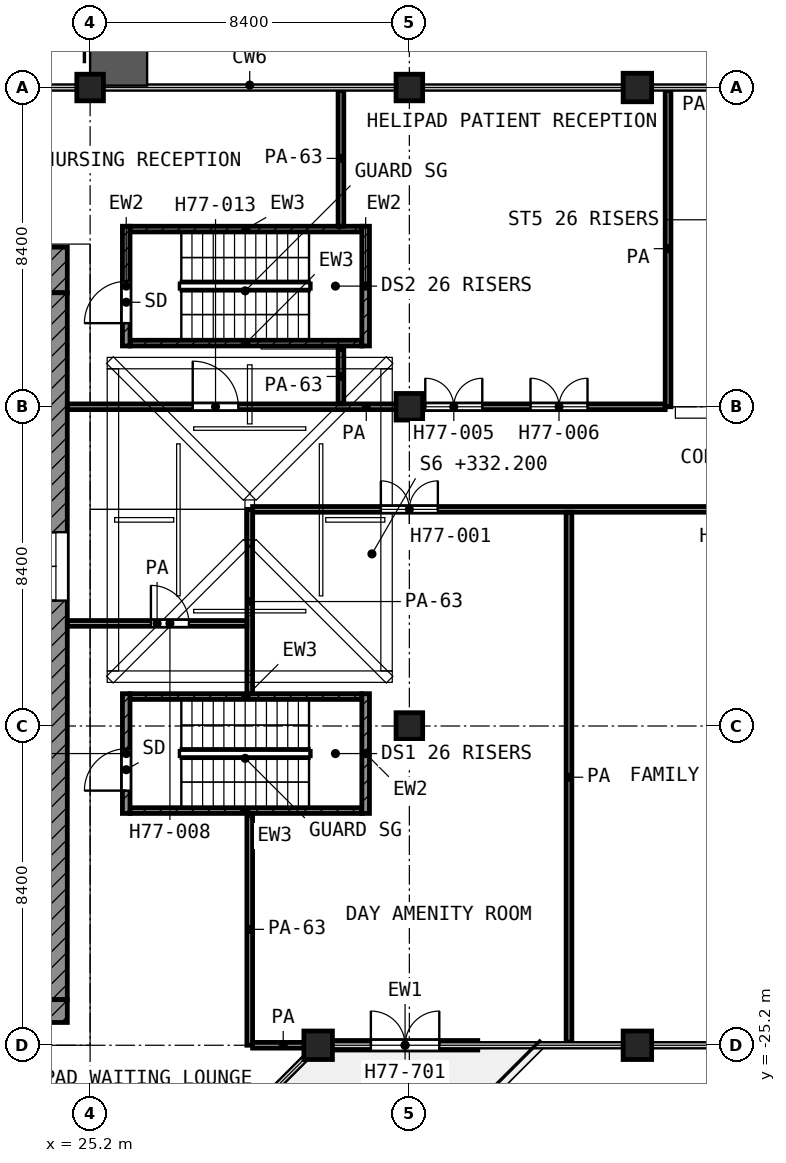
"""IFC4 building model, lengths in metres.
Left out: names, types, materials, properties, quantities, classifications, styles, units other than length and angle.
Written with IfcOpenShell. Run it as: python <this file> out.ifc"""

import sys

from ifc_helpers import new_model, si_unit, direction, frame, frame_2d, origin, origin_2d, place, context, subcontext, project, spatial, polyline, rectangle, outline, extrude, element, fill, save


model = new_model("IFC4")
c1 = context("Model", 3, precision=1e-05, world=origin(), true_north=direction((0.0, 1.0)))
c2 = subcontext(c1, "Body", "Model", "MODEL_VIEW")
j1 = project(units=[si_unit("LENGTHUNIT", "METRE"), si_unit("PLANEANGLEUNIT", "RADIAN")], contexts=[c1])
p1 = place(None, origin())
s1 = spatial("IfcSite", under=j1, at=p1, CompositionType="ELEMENT")
p2 = place(p1, origin())
s2 = spatial("IfcBuilding", under=s1, at=p2, CompositionType="ELEMENT")
p3 = place(p2, frame((0.0, 0.0, 332.2)))
s3 = spatial("IfcBuildingStorey", under=s2, at=p3, CompositionType="ELEMENT", Elevation=332.2)
for number, where, z_axis, x_axis in (
    (1, (25.2, 0.0, 0.0), (0.0, 0.0, 1.0), (1.0, 0.0, 0.0)),
    (2, (33.6, 0.0, 0.0), (0.0, 0.0, 1.0), (1.0, 0.0, 0.0)),
    (3, (33.6, -8.4, 0.0), (0.0, 0.0, 1.0), (1.0, 0.0, 0.0)),
    (4, (33.6, -16.8, 0.0), (0.0, 0.0, 1.0), (1.0, 0.0, 0.0)),
):
    element("IfcColumn", number, at=place(p3, frame(where, z_axis=z_axis, x_axis=x_axis)), inside=s3, PredefinedType="COLUMN", context=c2, shape_type="SweptSolid", body=[
        extrude(rectangle(XDim=0.7, YDim=0.7, at=origin_2d()), origin(), (0.0, 0.0, 1.0), 4.5),
    ])
for number, where, z_axis, x_axis in (
    (5, (31.2, -25.2, 0.0), (0.0, 0.0, 1.0), (1.0, 0.0, 0.0)),
    (6, (39.6, 0.0, 0.0), (0.0, 0.0, 1.0), (1.0, 0.0, 0.0)),
    (7, (39.6, -25.2, 0.0), (0.0, 0.0, 1.0), (1.0, 0.0, 0.0)),
):
    element("IfcColumn", number, at=place(p3, frame(where, z_axis=z_axis, x_axis=x_axis)), inside=s3, PredefinedType="COLUMN", context=c2, shape_type="SweptSolid", body=[
        extrude(rectangle(XDim=0.75, YDim=0.75, at=origin_2d()), origin(), (0.0, 0.0, 1.0), 4.5),
    ])
p4 = place(p3, frame((31.575, -25.2, 0.0), z_axis=(0.0, 0.0, 1.0), x_axis=(1.0, 0.0, 0.0)))
e8 = element("IfcWall", 8, at=p4, inside=s3, PredefinedType="SOLIDWALL", context=c2, shape_type="SweptSolid", body=[
    extrude(rectangle(XDim=3.825, YDim=0.25, at=frame_2d((1.913, 0.0))), origin(), (0.0, 0.0, 1.0), 3.79),
])
p5 = place(p4, frame((1.012, 0.0, 0.0)))
e9 = element("IfcOpeningElement", 9, at=p5, cuts=e8, PredefinedType="OPENING", context=c2, shape_type="SweptSolid", body=[
    extrude(rectangle(XDim=1.8, YDim=2.1, at=frame_2d((0.9, 1.05))), frame((0.0, 0.135, 0.0), z_axis=(0.0, -1.0, 0.0), x_axis=(1.0, 0.0, 0.0)), (0.0, 0.0, 1.0), 0.27),
])
p6 = place(p3, frame((39.228, -25.075, 4.5), z_axis=(0.0, 0.0, 1.0), x_axis=(-1.0, 0.0, 0.0)))
e10 = element("IfcWall", 10, at=p6, inside=s3, PredefinedType="SOLIDWALL", context=c2, shape_type="SweptSolid", body=[
    extrude(rectangle(XDim=8.131, YDim=0.25, at=frame_2d((4.065, 0.0))), origin(), (0.0, 0.0, 1.0), 1.1),
])
p7 = place(p3, frame((31.112, -25.112, 4.5), z_axis=(0.0, 0.0, 1.0), x_axis=(-0.707106781187, -0.707106781187, 0.0)))
e11 = element("IfcWall", 11, at=p7, inside=s3, PredefinedType="SOLIDWALL", context=c2, shape_type="SweptSolid", body=[
    extrude(rectangle(XDim=8.31, YDim=0.25, at=frame_2d((4.155, 0.0))), origin(), (0.0, 0.0, 1.0), 1.1),
])
p8 = place(p3, frame((25.375, -0.125, 4.5), z_axis=(0.0, 0.0, 1.0), x_axis=(1.0, 0.0, 0.0)))
e12 = element("IfcWall", 12, at=p8, inside=s3, PredefinedType="SOLIDWALL", context=c2, shape_type="SweptSolid", body=[
    extrude(rectangle(XDim=13.853, YDim=0.25, at=frame_2d((6.926, 0.0))), origin(), (0.0, 0.0, 1.0), 1.1),
])
p9 = place(p3, frame((28.675, -19.25, 4.5), z_axis=(0.0, 0.0, 1.0), x_axis=(0.0, -1.0, 0.0)))
e13 = element("IfcWall", 13, at=p9, inside=s3, PredefinedType="SOLIDWALL", context=c2, shape_type="SweptSolid", body=[
    extrude(rectangle(XDim=4.4, YDim=0.25, at=frame_2d((2.2, 0.0))), origin(), (0.0, 0.0, 1.0), 1.1),
])
p10 = place(p3, frame((32.175, -19.25, 4.5), z_axis=(0.0, 0.0, 1.0), x_axis=(0.0, -1.0, 0.0)))
e14 = element("IfcWall", 14, at=p10, inside=s3, PredefinedType="SOLIDWALL", context=c2, shape_type="SweptSolid", body=[
    extrude(rectangle(XDim=4.4, YDim=0.25, at=frame_2d((2.2, 0.0))), origin(), (0.0, 0.0, 1.0), 1.717),
])
for number, where, z_axis, x_axis in (
    (15, (28.8, -19.375, 4.5), (0.0, 0.0, 1.0), (1.0, 0.0, 0.0)),
    (16, (28.8, -23.525, 4.5), (0.0, 0.0, 1.0), (1.0, 0.0, 0.0)),
):
    element("IfcWall", number, at=place(p3, frame(where, z_axis=z_axis, x_axis=x_axis)), inside=s3, PredefinedType="SOLIDWALL", context=c2, shape_type="SweptSolid", body=[
        extrude(outline(polyline([(0.0, 0.0), (3.25, 0.0), (3.25, 1.695), (0.0, 1.122), (0.0, 0.0)])), frame((0.0, 0.125, 0.0), z_axis=(0.0, -1.0, 0.0), x_axis=(1.0, 0.0, 0.0)), (0.0, 0.0, 1.0), 0.25),
    ])
p11 = place(p3, frame((25.05, 0.683, 4.5), z_axis=(0.0, 0.0, 1.0), x_axis=(0.0, -1.0, 0.0)))
e17 = element("IfcWall", 17, at=p11, inside=s3, PredefinedType="SOLIDWALL", context=c2, shape_type="SweptSolid", body=[
    extrude(rectangle(XDim=0.551, YDim=0.25, at=frame_2d((0.275, 0.0))), origin(), (0.0, 0.0, 1.0), 1.1),
])
p12 = place(p3, frame((4.2, -4.8, 0.0), z_axis=(0.0, 0.0, 1.0), x_axis=(1.0, 0.0, 0.0)))
e18 = element("IfcWall", 18, at=p12, inside=s3, PredefinedType="SHEAR", context=c2, shape_type="SweptSolid", body=[
    extrude(rectangle(XDim=20.4, YDim=1.2, at=frame_2d((10.2, 0.0))), origin(), (0.0, 0.0, 1.0), 3.95),
])
p13 = place(p12, frame((1.95, 0.0, 0.0)))
e19 = element("IfcOpeningElement", 19, at=p13, cuts=e18, PredefinedType="OPENING", context=c2, shape_type="SweptSolid", body=[
    extrude(rectangle(XDim=1.1, YDim=2.1, at=frame_2d((0.55, 1.05))), frame((0.0, 0.61, 0.0), z_axis=(0.0, -1.0, 0.0), x_axis=(1.0, 0.0, 0.0)), (0.0, 0.0, 1.0), 1.22),
])
p14 = place(p12, frame((17.95, 0.0, 0.0)))
e20 = element("IfcOpeningElement", 20, at=p14, cuts=e18, PredefinedType="OPENING", context=c2, shape_type="SweptSolid", body=[
    extrude(rectangle(XDim=1.1, YDim=2.1, at=frame_2d((0.55, 1.05))), frame((0.0, 0.61, 0.0), z_axis=(0.0, -1.0, 0.0), x_axis=(1.0, 0.0, 0.0)), (0.0, 0.0, 1.0), 1.22),
])
p15 = place(p3, frame((24.3, -24.0, 0.0), z_axis=(0.0, 0.0, 1.0), x_axis=(0.0, 1.0, 0.0)))
e21 = element("IfcWall", 21, at=p15, inside=s3, PredefinedType="SHEAR", context=c2, shape_type="SweptSolid", body=[
    extrude(rectangle(XDim=18.6, YDim=0.6, at=frame_2d((9.3, 0.0))), origin(), (0.0, 0.0, 1.0), 3.95),
])
p16 = place(p15, frame((10.5, 0.0, 0.0)))
e22 = element("IfcOpeningElement", 22, at=p16, cuts=e21, PredefinedType="OPENING", context=c2, shape_type="SweptSolid", body=[
    extrude(rectangle(XDim=1.8, YDim=2.1, at=frame_2d((0.9, 1.05))), frame((0.0, 0.31, 0.0), z_axis=(0.0, -1.0, 0.0), x_axis=(1.0, 0.0, 0.0)), (0.0, 0.0, 1.0), 0.62),
])
p17 = place(p3, frame((24.3, -24.6, 0.0), z_axis=(0.0, 0.0, 1.0), x_axis=(0.0, 1.0, 0.0)))
e23 = element("IfcWall", 23, at=p17, inside=s3, PredefinedType="SHEAR", context=c2, shape_type="SweptSolid", body=[
    extrude(rectangle(XDim=0.6, YDim=0.6, at=frame_2d((0.3, 0.0))), origin(), (0.0, 0.0, 1.0), 3.95),
])
p18 = place(p3, frame((26.15, -19.1, 0.0), z_axis=(0.0, 0.0, 1.0), x_axis=(0.0, 1.0, 0.0)))
e24 = element("IfcWall", 24, at=p18, inside=s3, PredefinedType="SHEAR", context=c2, shape_type="SweptSolid", body=[
    extrude(rectangle(XDim=3.15, YDim=0.2, at=frame_2d((1.575, 0.0))), origin(), (0.0, 0.0, 1.0), 3.95),
])
p19 = place(p18, frame((0.6, 0.0, 0.0)))
e25 = element("IfcOpeningElement", 25, at=p19, cuts=e24, PredefinedType="OPENING", context=c2, shape_type="SweptSolid", body=[
    extrude(rectangle(XDim=1.1, YDim=2.1, at=frame_2d((0.55, 1.05))), frame((0.0, 0.11, 0.0), z_axis=(0.0, -1.0, 0.0), x_axis=(1.0, 0.0, 0.0)), (0.0, 0.0, 1.0), 0.22),
])
p20 = place(p3, frame((32.45, -19.1, 0.0), z_axis=(0.0, 0.0, 1.0), x_axis=(0.0, 1.0, 0.0)))
e26 = element("IfcWall", 26, at=p20, inside=s3, PredefinedType="SHEAR", context=c2, shape_type="SweptSolid", body=[
    extrude(rectangle(XDim=3.15, YDim=0.2, at=frame_2d((1.575, 0.0))), origin(), (0.0, 0.0, 1.0), 3.95),
])
for number, where, z_axis, x_axis in (
    (27, (26.25, -16.025, 0.0), (0.0, 0.0, 1.0), (1.0, 0.0, 0.0)),
    (28, (26.25, -19.025, 0.0), (0.0, 0.0, 1.0), (1.0, 0.0, 0.0)),
):
    element("IfcWall", number, at=place(p3, frame(where, z_axis=z_axis, x_axis=x_axis)), inside=s3, PredefinedType="SHEAR", context=c2, shape_type="SweptSolid", body=[
        extrude(rectangle(XDim=6.1, YDim=0.15, at=frame_2d((3.05, 0.0))), origin(), (0.0, 0.0, 1.0), 3.95),
    ])
p21 = place(p3, frame((26.15, -6.8, 0.0), z_axis=(0.0, 0.0, 1.0), x_axis=(0.0, 1.0, 0.0)))
e29 = element("IfcWall", 29, at=p21, inside=s3, PredefinedType="SHEAR", context=c2, shape_type="SweptSolid", body=[
    extrude(rectangle(XDim=3.15, YDim=0.2, at=frame_2d((1.575, 0.0))), origin(), (0.0, 0.0, 1.0), 3.95),
])
p22 = place(p21, frame((0.6, 0.0, 0.0)))
e30 = element("IfcOpeningElement", 30, at=p22, cuts=e29, PredefinedType="OPENING", context=c2, shape_type="SweptSolid", body=[
    extrude(rectangle(XDim=1.1, YDim=2.1, at=frame_2d((0.55, 1.05))), frame((0.0, 0.11, 0.0), z_axis=(0.0, -1.0, 0.0), x_axis=(1.0, 0.0, 0.0)), (0.0, 0.0, 1.0), 0.22),
])
p23 = place(p3, frame((32.45, -6.8, 0.0), z_axis=(0.0, 0.0, 1.0), x_axis=(0.0, 1.0, 0.0)))
e31 = element("IfcWall", 31, at=p23, inside=s3, PredefinedType="SHEAR", context=c2, shape_type="SweptSolid", body=[
    extrude(rectangle(XDim=3.15, YDim=0.2, at=frame_2d((1.575, 0.0))), origin(), (0.0, 0.0, 1.0), 3.95),
])
for number, where, z_axis, x_axis in (
    (32, (26.25, -3.725, 0.0), (0.0, 0.0, 1.0), (1.0, 0.0, 0.0)),
    (33, (26.25, -6.725, 0.0), (0.0, 0.0, 1.0), (1.0, 0.0, 0.0)),
):
    element("IfcWall", number, at=place(p3, frame(where, z_axis=z_axis, x_axis=x_axis)), inside=s3, PredefinedType="SHEAR", context=c2, shape_type="SweptSolid", body=[
        extrude(rectangle(XDim=6.1, YDim=0.15, at=frame_2d((3.05, 0.0))), origin(), (0.0, 0.0, 1.0), 3.95),
    ])
p24 = place(p3, frame((29.475, -25.2, 0.0), z_axis=(0.0, 0.0, 1.0), x_axis=(1.0, 0.0, 0.0)))
e34 = element("IfcWall", 34, at=p24, inside=s3, PredefinedType="PARTITIONING", context=c2, shape_type="SweptSolid", body=[
    extrude(rectangle(XDim=1.612, YDim=0.15, at=frame_2d((0.806, 0.0))), origin(), (0.0, 0.0, 1.0), 3.95),
])
p25 = place(p3, frame((24.6, -14.1, 0.0), z_axis=(0.0, 0.0, 1.0), x_axis=(1.0, 0.0, 0.0)))
e35 = element("IfcWall", 35, at=p25, inside=s3, PredefinedType="PARTITIONING", context=c2, shape_type="SweptSolid", body=[
    extrude(rectangle(XDim=4.725, YDim=0.15, at=frame_2d((2.362, 0.0))), origin(), (0.0, 0.0, 1.0), 3.95),
])
p26 = place(p25, frame((2.2, 0.0, 0.0)))
e36 = element("IfcOpeningElement", 36, at=p26, cuts=e35, PredefinedType="OPENING", context=c2, shape_type="SweptSolid", body=[
    extrude(rectangle(XDim=1.0, YDim=2.1, at=frame_2d((0.5, 1.05))), frame((0.0, 0.085, 0.0), z_axis=(0.0, -1.0, 0.0), x_axis=(1.0, 0.0, 0.0)), (0.0, 0.0, 1.0), 0.17),
])
p27 = place(p3, frame((29.475, -11.1, 0.0), z_axis=(0.0, 0.0, 1.0), x_axis=(1.0, 0.0, 0.0)))
e37 = element("IfcWall", 37, at=p27, inside=s3, PredefinedType="PARTITIONING", context=c2, shape_type="SweptSolid", body=[
    extrude(rectangle(XDim=29.245, YDim=0.15, at=frame_2d((14.623, 0.0))), origin(), (0.0, 0.0, 1.0), 3.95),
])
p28 = place(p27, frame((3.375, 0.0, 0.0)))
e38 = element("IfcOpeningElement", 38, at=p28, cuts=e37, PredefinedType="OPENING", context=c2, shape_type="SweptSolid", body=[
    extrude(rectangle(XDim=1.5, YDim=2.1, at=frame_2d((0.75, 1.05))), frame((0.0, 0.085, 0.0), z_axis=(0.0, -1.0, 0.0), x_axis=(1.0, 0.0, 0.0)), (0.0, 0.0, 1.0), 0.17),
])
p29 = place(p27, frame((12.075, 0.0, 0.0)))
e39 = element("IfcOpeningElement", 39, at=p29, cuts=e37, PredefinedType="OPENING", context=c2, shape_type="SweptSolid", body=[
    extrude(rectangle(XDim=1.5, YDim=2.1, at=frame_2d((0.75, 1.05))), frame((0.0, 0.085, 0.0), z_axis=(0.0, -1.0, 0.0), x_axis=(1.0, 0.0, 0.0)), (0.0, 0.0, 1.0), 0.17),
])
p30 = place(p27, frame((18.625, 0.0, 0.0)))
e40 = element("IfcOpeningElement", 40, at=p30, cuts=e37, PredefinedType="OPENING", context=c2, shape_type="SweptSolid", body=[
    extrude(rectangle(XDim=1.0, YDim=2.1, at=frame_2d((0.5, 1.05))), frame((0.0, 0.085, 0.0), z_axis=(0.0, -1.0, 0.0), x_axis=(1.0, 0.0, 0.0)), (0.0, 0.0, 1.0), 0.17),
])
p31 = place(p27, frame((24.375, 0.0, 0.0)))
e41 = element("IfcOpeningElement", 41, at=p31, cuts=e37, PredefinedType="OPENING", context=c2, shape_type="SweptSolid", body=[
    extrude(rectangle(XDim=1.5, YDim=2.1, at=frame_2d((0.75, 1.05))), frame((0.0, 0.085, 0.0), z_axis=(0.0, -1.0, 0.0), x_axis=(1.0, 0.0, 0.0)), (0.0, 0.0, 1.0), 0.17),
])
p32 = place(p3, frame((24.6, -8.4, 0.0), z_axis=(0.0, 0.0, 1.0), x_axis=(1.0, 0.0, 0.0)))
e42 = element("IfcWall", 42, at=p32, inside=s3, PredefinedType="PARTITIONING", context=c2, shape_type="SweptSolid", body=[
    extrude(rectangle(XDim=15.732, YDim=0.15, at=frame_2d((7.866, 0.0))), origin(), (0.0, 0.0, 1.0), 3.95),
])
p33 = place(p32, frame((3.3, 0.0, 0.0)))
e43 = element("IfcOpeningElement", 43, at=p33, cuts=e42, PredefinedType="OPENING", context=c2, shape_type="SweptSolid", body=[
    extrude(rectangle(XDim=1.2, YDim=2.1, at=frame_2d((0.6, 1.05))), frame((0.0, 0.085, 0.0), z_axis=(0.0, -1.0, 0.0), x_axis=(1.0, 0.0, 0.0)), (0.0, 0.0, 1.0), 0.17),
])
p34 = place(p32, frame((9.419, 0.0, 0.0)))
e44 = element("IfcOpeningElement", 44, at=p34, cuts=e42, PredefinedType="OPENING", context=c2, shape_type="SweptSolid", body=[
    extrude(rectangle(XDim=1.5, YDim=2.1, at=frame_2d((0.75, 1.05))), frame((0.0, 0.085, 0.0), z_axis=(0.0, -1.0, 0.0), x_axis=(1.0, 0.0, 0.0)), (0.0, 0.0, 1.0), 0.17),
])
p35 = place(p32, frame((12.188, 0.0, 0.0)))
e45 = element("IfcOpeningElement", 45, at=p35, cuts=e42, PredefinedType="OPENING", context=c2, shape_type="SweptSolid", body=[
    extrude(rectangle(XDim=1.5, YDim=2.1, at=frame_2d((0.75, 1.05))), frame((0.0, 0.085, 0.0), z_axis=(0.0, -1.0, 0.0), x_axis=(1.0, 0.0, 0.0)), (0.0, 0.0, 1.0), 0.17),
])
p36 = place(p3, frame((29.4, -25.2, 0.0), z_axis=(0.0, 0.0, 1.0), x_axis=(0.0, 1.0, 0.0)))
e46 = element("IfcWall", 46, at=p36, inside=s3, PredefinedType="PARTITIONING", context=c2, shape_type="SweptSolid", body=[
    extrude(rectangle(XDim=6.1, YDim=0.15, at=frame_2d((3.05, 0.0))), origin(), (0.0, 0.0, 1.0), 2.85),
])
p37 = place(p3, frame((29.4, -15.95, 0.0), z_axis=(0.0, 0.0, 1.0), x_axis=(0.0, 1.0, 0.0)))
e47 = element("IfcWall", 47, at=p37, inside=s3, PredefinedType="PARTITIONING", context=c2, shape_type="SweptSolid", body=[
    extrude(rectangle(XDim=4.85, YDim=0.15, at=frame_2d((2.425, 0.0))), origin(), (0.0, 0.0, 1.0), 2.85),
])
p38 = place(p3, frame((31.8, -8.325, 0.0), z_axis=(0.0, 0.0, 1.0), x_axis=(0.0, 1.0, 0.0)))
e48 = element("IfcWall", 48, at=p38, inside=s3, PredefinedType="PARTITIONING", context=c2, shape_type="SweptSolid", body=[
    extrude(rectangle(XDim=1.445, YDim=0.15, at=frame_2d((0.723, 0.0))), origin(), (0.0, 0.0, 1.0), 2.85),
])
p39 = place(p3, frame((31.8, -3.65, 0.0), z_axis=(0.0, 0.0, 1.0), x_axis=(0.0, 1.0, 0.0)))
e49 = element("IfcWall", 49, at=p39, inside=s3, PredefinedType="PARTITIONING", context=c2, shape_type="SweptSolid", body=[
    extrude(rectangle(XDim=3.57, YDim=0.15, at=frame_2d((1.785, 0.0))), origin(), (0.0, 0.0, 1.0), 2.85),
])
p40 = place(p3, frame((37.8, -25.12, 0.0), z_axis=(0.0, 0.0, 1.0), x_axis=(0.0, 1.0, 0.0)))
e50 = element("IfcWall", 50, at=p40, inside=s3, PredefinedType="PARTITIONING", context=c2, shape_type="SweptSolid", body=[
    extrude(rectangle(XDim=13.945, YDim=0.15, at=frame_2d((6.973, 0.0))), origin(), (0.0, 0.0, 1.0), 3.95),
])
p41 = place(p3, frame((40.407, -8.4, 0.0), z_axis=(0.0, 0.0, 1.0), x_axis=(0.0, 1.0, 0.0)))
e51 = element("IfcWall", 51, at=p41, inside=s3, PredefinedType="PARTITIONING", context=c2, shape_type="SweptSolid", body=[
    extrude(rectangle(XDim=8.32, YDim=0.15, at=frame_2d((4.16, 0.0))), origin(), (0.0, 0.0, 1.0), 3.95),
])
p42 = place(p5, origin())
e52 = element("IfcDoor", 52, at=p42, inside=s3, OperationType="DOUBLE_DOOR_SINGLE_SWING", PredefinedType="DOOR", context=c2, shape_type="SweptSolid", body=[
    extrude(rectangle(XDim=1.8, YDim=2.1, at=frame_2d((0.9, 1.05))), frame((0.0, 0.025, 0.0), z_axis=(0.0, -1.0, 0.0), x_axis=(1.0, 0.0, 0.0)), (0.0, 0.0, 1.0), 0.05),
])
fill(e9, e52)
p43 = place(p16, origin())
e53 = element("IfcDoor", 53, at=p43, inside=s3, OperationType="DOUBLE_DOOR_SINGLE_SWING", PredefinedType="DOOR", context=c2, shape_type="SweptSolid", body=[
    extrude(rectangle(XDim=1.8, YDim=2.1, at=frame_2d((0.9, 1.05))), frame((0.0, 0.025, 0.0), z_axis=(0.0, -1.0, 0.0), x_axis=(1.0, 0.0, 0.0)), (0.0, 0.0, 1.0), 0.05),
])
fill(e22, e53)
p44 = place(p19, origin())
e54 = element("IfcDoor", 54, at=p44, inside=s3, OperationType="SINGLE_SWING_LEFT", PredefinedType="DOOR", context=c2, shape_type="SweptSolid", body=[
    extrude(rectangle(XDim=1.1, YDim=2.1, at=frame_2d((0.55, 1.05))), frame((0.0, 0.025, 0.0), z_axis=(0.0, -1.0, 0.0), x_axis=(1.0, 0.0, 0.0)), (0.0, 0.0, 1.0), 0.05),
])
fill(e25, e54)
p45 = place(p22, origin())
e55 = element("IfcDoor", 55, at=p45, inside=s3, OperationType="SINGLE_SWING_LEFT", PredefinedType="DOOR", context=c2, shape_type="SweptSolid", body=[
    extrude(rectangle(XDim=1.1, YDim=2.1, at=frame_2d((0.55, 1.05))), frame((0.0, 0.025, 0.0), z_axis=(0.0, -1.0, 0.0), x_axis=(1.0, 0.0, 0.0)), (0.0, 0.0, 1.0), 0.05),
])
fill(e30, e55)
p46 = place(p26, origin())
e56 = element("IfcDoor", 56, at=p46, inside=s3, OperationType="SINGLE_SWING_LEFT", PredefinedType="DOOR", context=c2, shape_type="SweptSolid", body=[
    extrude(rectangle(XDim=1.0, YDim=2.1, at=frame_2d((0.5, 1.05))), frame((0.0, 0.025, 0.0), z_axis=(0.0, -1.0, 0.0), x_axis=(1.0, 0.0, 0.0)), (0.0, 0.0, 1.0), 0.05),
])
fill(e36, e56)
p47 = place(p33, origin())
e57 = element("IfcDoor", 57, at=p47, inside=s3, OperationType="SINGLE_SWING_LEFT", PredefinedType="DOOR", context=c2, shape_type="SweptSolid", body=[
    extrude(rectangle(XDim=1.2, YDim=2.1, at=frame_2d((0.6, 1.05))), frame((0.0, 0.025, 0.0), z_axis=(0.0, -1.0, 0.0), x_axis=(1.0, 0.0, 0.0)), (0.0, 0.0, 1.0), 0.05),
])
fill(e43, e57)
p48 = place(p28, origin())
e58 = element("IfcDoor", 58, at=p48, inside=s3, OperationType="DOUBLE_DOOR_SINGLE_SWING", PredefinedType="DOOR", context=c2, shape_type="SweptSolid", body=[
    extrude(rectangle(XDim=1.5, YDim=2.1, at=frame_2d((0.75, 1.05))), frame((0.0, 0.025, 0.0), z_axis=(0.0, -1.0, 0.0), x_axis=(1.0, 0.0, 0.0)), (0.0, 0.0, 1.0), 0.05),
])
fill(e38, e58)
p49 = place(p34, origin())
e59 = element("IfcDoor", 59, at=p49, inside=s3, OperationType="DOUBLE_DOOR_SINGLE_SWING", PredefinedType="DOOR", context=c2, shape_type="SweptSolid", body=[
    extrude(rectangle(XDim=1.5, YDim=2.1, at=frame_2d((0.75, 1.05))), frame((0.0, 0.025, 0.0), z_axis=(0.0, -1.0, 0.0), x_axis=(1.0, 0.0, 0.0)), (0.0, 0.0, 1.0), 0.05),
])
fill(e44, e59)
p50 = place(p35, origin())
e60 = element("IfcDoor", 60, at=p50, inside=s3, OperationType="DOUBLE_DOOR_SINGLE_SWING", PredefinedType="DOOR", context=c2, shape_type="SweptSolid", body=[
    extrude(rectangle(XDim=1.5, YDim=2.1, at=frame_2d((0.75, 1.05))), frame((0.0, 0.025, 0.0), z_axis=(0.0, -1.0, 0.0), x_axis=(1.0, 0.0, 0.0)), (0.0, 0.0, 1.0), 0.05),
])
fill(e45, e60)
save(model, sys.argv[1])
